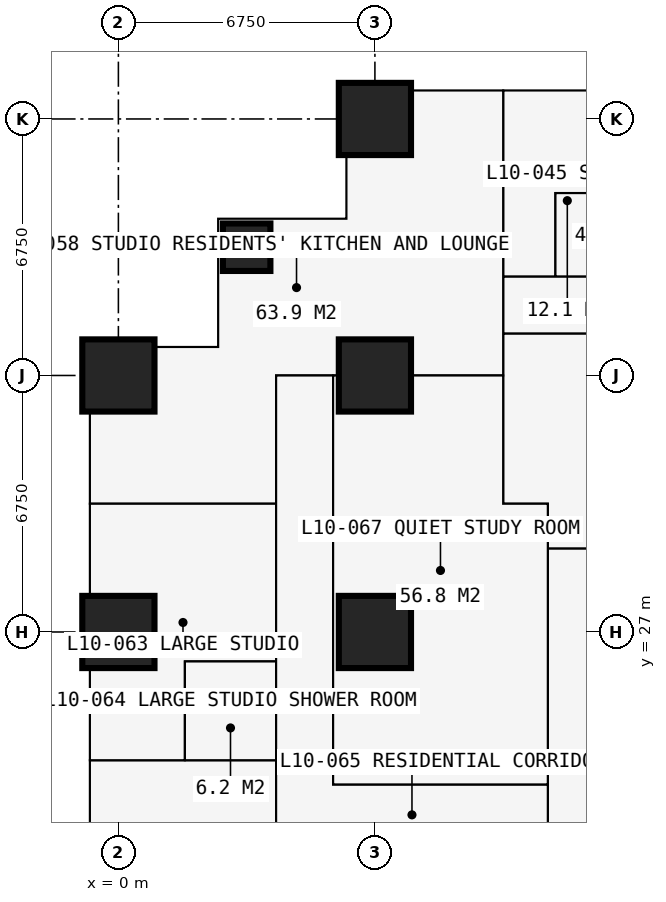
"""IFC4 building model, lengths in metres.
Left out: names, types, materials, properties, quantities, classifications, styles, units other than length and angle.
Written with IfcOpenShell. Run it as: python <this file> out.ifc"""

import sys

from ifc_helpers import new_model, si_unit, direction, frame, frame_2d, origin, origin_2d, place, context, subcontext, project, spatial, rectangle, extrude, element, fill, save


model = new_model("IFC4")
c1 = context("Model", 3, precision=1e-05, world=origin(), true_north=direction((0.0, 1.0)))
c2 = subcontext(c1, "Body", "Model", "MODEL_VIEW")
j1 = project(units=[si_unit("LENGTHUNIT", "METRE"), si_unit("PLANEANGLEUNIT", "RADIAN")], contexts=[c1])
p1 = place(None, origin())
s1 = spatial("IfcSite", under=j1, at=p1, CompositionType="ELEMENT")
p2 = place(p1, origin())
s2 = spatial("IfcBuilding", under=s1, at=p2, CompositionType="ELEMENT")
p3 = place(p2, frame((0.0, 0.0, 39.6)))
s3 = spatial("IfcBuildingStorey", under=s2, at=p3, CompositionType="ELEMENT", Elevation=39.6)
for number, where, z_axis, x_axis in (
    (1, (0.0, 27.0, 0.0), (0.0, 0.0, 1.0), (1.0, 0.0, 0.0)),
    (2, (0.0, 33.75, 0.0), (0.0, 0.0, 1.0), (1.0, 0.0, 0.0)),
):
    element("IfcColumn", number, at=place(p3, frame(where, z_axis=z_axis, x_axis=x_axis)), inside=s3, PredefinedType="COLUMN", context=c2, shape_type="SweptSolid", body=[
        extrude(rectangle(XDim=1.9, YDim=1.9, at=origin_2d()), origin(), (0.0, 0.0, 1.0), 3.6),
    ])
p4 = place(p3, frame((3.375, 37.125, 0.0), z_axis=(0.0, 0.0, 1.0), x_axis=(1.0, 0.0, 0.0)))
e3 = element("IfcColumn", 3, at=p4, inside=s3, PredefinedType="COLUMN", context=c2, shape_type="SweptSolid", body=[
    extrude(rectangle(XDim=1.25, YDim=1.25, at=origin_2d()), origin(), (0.0, 0.0, 1.0), 3.6),
])
for number, where, z_axis, x_axis in (
    (4, (6.75, 27.0, 0.0), (0.0, 0.0, 1.0), (1.0, 0.0, 0.0)),
    (5, (6.75, 33.75, 0.0), (0.0, 0.0, 1.0), (1.0, 0.0, 0.0)),
    (6, (6.75, 40.5, 0.0), (0.0, 0.0, 1.0), (1.0, 0.0, 0.0)),
):
    element("IfcColumn", number, at=place(p3, frame(where, z_axis=z_axis, x_axis=x_axis)), inside=s3, PredefinedType="COLUMN", context=c2, shape_type="SweptSolid", body=[
        extrude(rectangle(XDim=1.9, YDim=1.9, at=origin_2d()), origin(), (0.0, 0.0, 1.0), 3.6),
    ])
p5 = place(p3, frame((6.0, 41.25, 0.0), z_axis=(0.0, 0.0, 1.0), x_axis=(0.0, -1.0, 0.0)))
e7 = element("IfcWall", 7, at=p5, inside=s3, PredefinedType="SOLIDWALL", context=c2, shape_type="SweptSolid", body=[
    extrude(rectangle(XDim=3.375, YDim=0.3, at=frame_2d((1.688, 0.0))), origin(), (0.0, 0.0, 1.0), 3.375),
])
p6 = place(p5, frame((1.857, 0.0, 0.9)))
e8 = element("IfcOpeningElement", 8, at=p6, cuts=e7, PredefinedType="OPENING", context=c2, shape_type="SweptSolid", body=[
    extrude(rectangle(XDim=1.2, YDim=1.8, at=frame_2d((0.6, 0.9))), frame((0.0, 0.16, 0.0), z_axis=(0.0, -1.0, 0.0), x_axis=(1.0, 0.0, 0.0)), (0.0, 0.0, 1.0), 0.32),
])
p7 = place(p3, frame((6.0, 37.875, 0.0), z_axis=(0.0, 0.0, 1.0), x_axis=(-1.0, 0.0, 0.0)))
e9 = element("IfcWall", 9, at=p7, inside=s3, PredefinedType="SOLIDWALL", context=c2, shape_type="SweptSolid", body=[
    extrude(rectangle(XDim=3.375, YDim=0.3, at=frame_2d((1.688, 0.0))), origin(), (0.0, 0.0, 1.0), 3.375),
])
p8 = place(p7, frame((0.788, 0.0, 0.6)))
e10 = element("IfcOpeningElement", 10, at=p8, cuts=e9, PredefinedType="OPENING", context=c2, shape_type="SweptSolid", body=[
    extrude(rectangle(XDim=1.8, YDim=2.1, at=frame_2d((0.9, 1.05))), frame((0.0, 0.16, 0.0), z_axis=(0.0, -1.0, 0.0), x_axis=(1.0, 0.0, 0.0)), (0.0, 0.0, 1.0), 0.32),
])
p9 = place(p3, frame((2.625, 37.875, 0.0), z_axis=(0.0, 0.0, 1.0), x_axis=(0.0, -1.0, 0.0)))
e11 = element("IfcWall", 11, at=p9, inside=s3, PredefinedType="SOLIDWALL", context=c2, shape_type="SweptSolid", body=[
    extrude(rectangle(XDim=3.375, YDim=0.3, at=frame_2d((1.688, 0.0))), origin(), (0.0, 0.0, 1.0), 3.375),
])
p10 = place(p9, frame((0.788, 0.0, 0.6)))
e12 = element("IfcOpeningElement", 12, at=p10, cuts=e11, PredefinedType="OPENING", context=c2, shape_type="SweptSolid", body=[
    extrude(rectangle(XDim=1.8, YDim=2.1, at=frame_2d((0.9, 1.05))), frame((0.0, 0.16, 0.0), z_axis=(0.0, -1.0, 0.0), x_axis=(1.0, 0.0, 0.0)), (0.0, 0.0, 1.0), 0.32),
])
p11 = place(p3, frame((2.625, 34.5, 0.0), z_axis=(0.0, 0.0, 1.0), x_axis=(-1.0, 0.0, 0.0)))
e13 = element("IfcWall", 13, at=p11, inside=s3, PredefinedType="SOLIDWALL", context=c2, shape_type="SweptSolid", body=[
    extrude(rectangle(XDim=3.375, YDim=0.3, at=frame_2d((1.688, 0.0))), origin(), (0.0, 0.0, 1.0), 3.375),
])
p12 = place(p11, frame((0.317, 0.0, 0.9)))
e14 = element("IfcOpeningElement", 14, at=p12, cuts=e13, PredefinedType="OPENING", context=c2, shape_type="SweptSolid", body=[
    extrude(rectangle(XDim=1.2, YDim=1.8, at=frame_2d((0.6, 0.9))), frame((0.0, 0.16, 0.0), z_axis=(0.0, -1.0, 0.0), x_axis=(1.0, 0.0, 0.0)), (0.0, 0.0, 1.0), 0.32),
])
p13 = place(p3, frame((-0.734, 23.625, 0.0), z_axis=(0.0, 0.0, 1.0), x_axis=(1.0, 0.0, 0.0)))
e15 = element("IfcWall", 15, at=p13, inside=s3, PredefinedType="PARTITIONING", context=c2, shape_type="SweptSolid", body=[
    extrude(rectangle(XDim=4.884, YDim=0.175, at=frame_2d((2.442, 0.0))), origin(), (0.0, 0.0, 1.0), 3.375),
])
p14 = place(p13, frame((3.234, 0.0, 0.0)))
e16 = element("IfcOpeningElement", 16, at=p14, cuts=e15, PredefinedType="OPENING", context=c2, shape_type="SweptSolid", body=[
    extrude(rectangle(XDim=0.9, YDim=2.2, at=frame_2d((0.45, 1.1))), frame((0.0, 0.097, 0.0), z_axis=(0.0, -1.0, 0.0), x_axis=(1.0, 0.0, 0.0)), (0.0, 0.0, 1.0), 0.195),
])
p15 = place(p3, frame((-0.734, 30.375, 0.0), z_axis=(0.0, 0.0, 1.0), x_axis=(1.0, 0.0, 0.0)))
e17 = element("IfcWall", 17, at=p15, inside=s3, PredefinedType="PARTITIONING", context=c2, shape_type="SweptSolid", body=[
    extrude(rectangle(XDim=4.884, YDim=0.15, at=frame_2d((2.442, 0.0))), origin(), (0.0, 0.0, 1.0), 3.375),
])
p16 = place(p3, frame((1.75, 23.625, 0.0), z_axis=(0.0, 0.0, 1.0), x_axis=(0.0, 1.0, 0.0)))
e18 = element("IfcWall", 18, at=p16, inside=s3, PredefinedType="PARTITIONING", context=c2, shape_type="SweptSolid", body=[
    extrude(rectangle(XDim=2.6, YDim=0.1, at=frame_2d((1.3, 0.0))), origin(), (0.0, 0.0, 1.0), 3.375),
])
p17 = place(p3, frame((1.75, 26.225, 0.0), z_axis=(0.0, 0.0, 1.0), x_axis=(1.0, 0.0, 0.0)))
e19 = element("IfcWall", 19, at=p17, inside=s3, PredefinedType="PARTITIONING", context=c2, shape_type="SweptSolid", body=[
    extrude(rectangle(XDim=2.4, YDim=0.1, at=frame_2d((1.2, 0.0))), origin(), (0.0, 0.0, 1.0), 3.375),
])
p18 = place(p3, frame((4.15, 10.125, 0.0), z_axis=(0.0, 0.0, 1.0), x_axis=(0.0, 1.0, 0.0)))
e20 = element("IfcWall", 20, at=p18, inside=s3, PredefinedType="PARTITIONING", context=c2, shape_type="SweptSolid", body=[
    extrude(rectangle(XDim=23.625, YDim=0.15, at=frame_2d((11.812, 0.0))), origin(), (0.0, 0.0, 1.0), 3.375),
])
p19 = place(p18, frame((4.2, 0.0, 0.0)))
e21 = element("IfcOpeningElement", 21, at=p19, cuts=e20, PredefinedType="OPENING", context=c2, shape_type="SweptSolid", body=[
    extrude(rectangle(XDim=0.95, YDim=2.2, at=frame_2d((0.475, 1.1))), frame((0.0, 0.085, 0.0), z_axis=(0.0, -1.0, 0.0), x_axis=(1.0, 0.0, 0.0)), (0.0, 0.0, 1.0), 0.17),
])
p20 = place(p18, frame((10.95, 0.0, 0.0)))
e22 = element("IfcOpeningElement", 22, at=p20, cuts=e20, PredefinedType="OPENING", context=c2, shape_type="SweptSolid", body=[
    extrude(rectangle(XDim=0.95, YDim=2.2, at=frame_2d((0.475, 1.1))), frame((0.0, 0.085, 0.0), z_axis=(0.0, -1.0, 0.0), x_axis=(1.0, 0.0, 0.0)), (0.0, 0.0, 1.0), 0.17),
])
p21 = place(p18, frame((17.7, 0.0, 0.0)))
e23 = element("IfcOpeningElement", 23, at=p21, cuts=e20, PredefinedType="OPENING", context=c2, shape_type="SweptSolid", body=[
    extrude(rectangle(XDim=0.95, YDim=2.2, at=frame_2d((0.475, 1.1))), frame((0.0, 0.085, 0.0), z_axis=(0.0, -1.0, 0.0), x_axis=(1.0, 0.0, 0.0)), (0.0, 0.0, 1.0), 0.17),
])
p22 = place(p3, frame((4.15, 33.75, 0.0), z_axis=(0.0, 0.0, 1.0), x_axis=(1.0, 0.0, 0.0)))
e24 = element("IfcWall", 24, at=p22, inside=s3, PredefinedType="PARTITIONING", context=c2, shape_type="SweptSolid", body=[
    extrude(rectangle(XDim=5.975, YDim=0.15, at=frame_2d((2.988, 0.0))), origin(), (0.0, 0.0, 1.0), 2.877),
])
p23 = place(p3, frame((5.65, 22.988, 0.0), z_axis=(0.0, 0.0, 1.0), x_axis=(0.0, 1.0, 0.0)))
e25 = element("IfcWall", 25, at=p23, inside=s3, PredefinedType="PARTITIONING", context=c2, shape_type="SweptSolid", body=[
    extrude(rectangle(XDim=10.762, YDim=0.15, at=frame_2d((5.381, 0.0))), origin(), (0.0, 0.0, 1.0), 3.375),
])
p24 = place(p23, frame((5.0, 0.0, 0.0)))
e26 = element("IfcOpeningElement", 26, at=p24, cuts=e25, PredefinedType="OPENING", context=c2, shape_type="SweptSolid", body=[
    extrude(rectangle(XDim=0.95, YDim=2.2, at=frame_2d((0.475, 1.1))), frame((0.0, 0.085, 0.0), z_axis=(0.0, -1.0, 0.0), x_axis=(1.0, 0.0, 0.0)), (0.0, 0.0, 1.0), 0.17),
])
p25 = place(p3, frame((5.65, 22.988, 0.0), z_axis=(0.0, 0.0, 1.0), x_axis=(1.0, 0.0, 0.0)))
e27 = element("IfcWall", 27, at=p25, inside=s3, PredefinedType="PARTITIONING", context=c2, shape_type="SweptSolid", body=[
    extrude(rectangle(XDim=5.65, YDim=0.15, at=frame_2d((2.825, 0.0))), origin(), (0.0, 0.0, 1.0), 3.375),
])
p26 = place(p3, frame((10.125, 30.375, 0.0), z_axis=(0.0, 0.0, 1.0), x_axis=(0.0, 1.0, 0.0)))
e28 = element("IfcWall", 28, at=p26, inside=s3, PredefinedType="PARTITIONING", context=c2, shape_type="SweptSolid", body=[
    extrude(rectangle(XDim=10.859, YDim=0.15, at=frame_2d((5.429, 0.0))), origin(), (0.0, 0.0, 1.0), 3.375),
])
p27 = place(p26, frame((4.725, 0.0, 0.0)))
e29 = element("IfcOpeningElement", 29, at=p27, cuts=e28, PredefinedType="OPENING", context=c2, shape_type="SweptSolid", body=[
    extrude(rectangle(XDim=1.0, YDim=2.2, at=frame_2d((0.5, 1.1))), frame((0.0, 0.085, 0.0), z_axis=(0.0, -1.0, 0.0), x_axis=(1.0, 0.0, 0.0)), (0.0, 0.0, 1.0), 0.17),
])
p28 = place(p3, frame((10.125, 30.375, 0.0), z_axis=(0.0, 0.0, 1.0), x_axis=(1.0, 0.0, 0.0)))
e30 = element("IfcWall", 30, at=p28, inside=s3, PredefinedType="PARTITIONING", context=c2, shape_type="SweptSolid", body=[
    extrude(rectangle(XDim=1.175, YDim=0.15, at=frame_2d((0.587, 0.0))), origin(), (0.0, 0.0, 1.0), 3.375),
])
p29 = place(p3, frame((10.125, 34.85, 0.0), z_axis=(0.0, 0.0, 1.0), x_axis=(1.0, 0.0, 0.0)))
e31 = element("IfcWall", 31, at=p29, inside=s3, PredefinedType="PARTITIONING", context=c2, shape_type="SweptSolid", body=[
    extrude(rectangle(XDim=10.762, YDim=0.15, at=frame_2d((5.381, 0.0))), origin(), (0.0, 0.0, 1.0), 3.375),
])
p30 = place(p29, frame((4.9, 0.0, 0.0)))
e32 = element("IfcOpeningElement", 32, at=p30, cuts=e31, PredefinedType="OPENING", context=c2, shape_type="SweptSolid", body=[
    extrude(rectangle(XDim=0.95, YDim=2.2, at=frame_2d((0.475, 1.1))), frame((0.0, 0.085, 0.0), z_axis=(0.0, -1.0, 0.0), x_axis=(1.0, 0.0, 0.0)), (0.0, 0.0, 1.0), 0.17),
])
p31 = place(p3, frame((10.125, 36.35, 0.0), z_axis=(0.0, 0.0, 1.0), x_axis=(1.0, 0.0, 0.0)))
e33 = element("IfcWall", 33, at=p31, inside=s3, PredefinedType="PARTITIONING", context=c2, shape_type="SweptSolid", body=[
    extrude(rectangle(XDim=23.625, YDim=0.1, at=frame_2d((11.812, 0.0))), origin(), (0.0, 0.0, 1.0), 3.375),
])
p32 = place(p31, frame((0.2, 0.0, 0.0)))
e34 = element("IfcOpeningElement", 34, at=p32, cuts=e33, PredefinedType="OPENING", context=c2, shape_type="SweptSolid", body=[
    extrude(rectangle(XDim=0.95, YDim=2.2, at=frame_2d((0.475, 1.1))), frame((0.0, 0.06, 0.0), z_axis=(0.0, -1.0, 0.0), x_axis=(1.0, 0.0, 0.0)), (0.0, 0.0, 1.0), 0.12),
])
p33 = place(p31, frame((3.625, 0.0, 0.0)))
e35 = element("IfcOpeningElement", 35, at=p33, cuts=e33, PredefinedType="OPENING", context=c2, shape_type="SweptSolid", body=[
    extrude(rectangle(XDim=0.95, YDim=2.2, at=frame_2d((0.475, 1.1))), frame((0.0, 0.06, 0.0), z_axis=(0.0, -1.0, 0.0), x_axis=(1.0, 0.0, 0.0)), (0.0, 0.0, 1.0), 0.12),
])
p34 = place(p31, frame((7.0, 0.0, 0.0)))
e36 = element("IfcOpeningElement", 36, at=p34, cuts=e33, PredefinedType="OPENING", context=c2, shape_type="SweptSolid", body=[
    extrude(rectangle(XDim=0.95, YDim=2.2, at=frame_2d((0.475, 1.1))), frame((0.0, 0.06, 0.0), z_axis=(0.0, -1.0, 0.0), x_axis=(1.0, 0.0, 0.0)), (0.0, 0.0, 1.0), 0.12),
])
p35 = place(p31, frame((10.375, 0.0, 0.0)))
e37 = element("IfcOpeningElement", 37, at=p35, cuts=e33, PredefinedType="OPENING", context=c2, shape_type="SweptSolid", body=[
    extrude(rectangle(XDim=0.95, YDim=2.2, at=frame_2d((0.475, 1.1))), frame((0.0, 0.06, 0.0), z_axis=(0.0, -1.0, 0.0), x_axis=(1.0, 0.0, 0.0)), (0.0, 0.0, 1.0), 0.12),
])
p36 = place(p31, frame((13.75, 0.0, 0.0)))
e38 = element("IfcOpeningElement", 38, at=p36, cuts=e33, PredefinedType="OPENING", context=c2, shape_type="SweptSolid", body=[
    extrude(rectangle(XDim=0.95, YDim=2.2, at=frame_2d((0.475, 1.1))), frame((0.0, 0.06, 0.0), z_axis=(0.0, -1.0, 0.0), x_axis=(1.0, 0.0, 0.0)), (0.0, 0.0, 1.0), 0.12),
])
p37 = place(p3, frame((11.3, 11.3, 0.0), z_axis=(0.0, 0.0, 1.0), x_axis=(0.0, 1.0, 0.0)))
e39 = element("IfcWall", 39, at=p37, inside=s3, PredefinedType="PARTITIONING", context=c2, shape_type="SweptSolid", body=[
    extrude(rectangle(XDim=19.075, YDim=0.15, at=frame_2d((9.538, 0.0))), origin(), (0.0, 0.0, 1.0), 3.375),
])
p38 = place(p37, frame((10.137, 0.0, 0.0)))
e40 = element("IfcOpeningElement", 40, at=p38, cuts=e39, PredefinedType="OPENING", context=c2, shape_type="SweptSolid", body=[
    extrude(rectangle(XDim=1.0, YDim=2.2, at=frame_2d((0.5, 1.1))), frame((0.0, 0.085, 0.0), z_axis=(0.0, -1.0, 0.0), x_axis=(1.0, 0.0, 0.0)), (0.0, 0.0, 1.0), 0.17),
])
p39 = place(p3, frame((11.3, 29.2, 0.0), z_axis=(0.0, 0.0, 1.0), x_axis=(1.0, 0.0, 0.0)))
e41 = element("IfcWall", 41, at=p39, inside=s3, PredefinedType="PARTITIONING", context=c2, shape_type="SweptSolid", body=[
    extrude(rectangle(XDim=19.075, YDim=0.15, at=frame_2d((9.538, 0.0))), origin(), (0.0, 0.0, 1.0), 3.375),
])
p40 = place(p39, frame((10.137, 0.0, 0.0)))
e42 = element("IfcOpeningElement", 42, at=p40, cuts=e41, PredefinedType="OPENING", context=c2, shape_type="SweptSolid", body=[
    extrude(rectangle(XDim=1.0, YDim=2.2, at=frame_2d((0.5, 1.1))), frame((0.0, 0.085, 0.0), z_axis=(0.0, -1.0, 0.0), x_axis=(1.0, 0.0, 0.0)), (0.0, 0.0, 1.0), 0.17),
])
p41 = place(p3, frame((11.5, 36.35, 0.0), z_axis=(0.0, 0.0, 1.0), x_axis=(0.0, 1.0, 0.0)))
e43 = element("IfcWall", 43, at=p41, inside=s3, PredefinedType="PARTITIONING", context=c2, shape_type="SweptSolid", body=[
    extrude(rectangle(XDim=2.2, YDim=0.1, at=frame_2d((1.1, 0.0))), origin(), (0.0, 0.0, 1.0), 3.375),
])
p42 = place(p41, frame((0.65, 0.0, 0.0)))
e44 = element("IfcOpeningElement", 44, at=p42, cuts=e43, PredefinedType="OPENING", context=c2, shape_type="SweptSolid", body=[
    extrude(rectangle(XDim=0.9, YDim=2.2, at=frame_2d((0.45, 1.1))), frame((0.0, 0.06, 0.0), z_axis=(0.0, -1.0, 0.0), x_axis=(1.0, 0.0, 0.0)), (0.0, 0.0, 1.0), 0.12),
])
p43 = place(p3, frame((11.5, 38.55, 0.0), z_axis=(0.0, 0.0, 1.0), x_axis=(1.0, 0.0, 0.0)))
e45 = element("IfcWall", 45, at=p43, inside=s3, PredefinedType="PARTITIONING", context=c2, shape_type="SweptSolid", body=[
    extrude(rectangle(XDim=2.0, YDim=0.1, at=frame_2d((1.0, 0.0))), origin(), (0.0, 0.0, 1.0), 3.375),
])
p44 = place(p6, origin())
e46 = element("IfcWindow", 46, at=p44, inside=s3, PartitioningType="SINGLE_PANEL", PredefinedType="WINDOW", context=c2, shape_type="SweptSolid", body=[
    extrude(rectangle(XDim=1.2, YDim=1.8, at=frame_2d((0.6, 0.9))), frame((0.0, 0.03, 0.0), z_axis=(0.0, -1.0, 0.0), x_axis=(1.0, 0.0, 0.0)), (0.0, 0.0, 1.0), 0.06),
])
fill(e8, e46)
p45 = place(p8, origin())
e47 = element("IfcWindow", 47, at=p45, inside=s3, PartitioningType="SINGLE_PANEL", PredefinedType="WINDOW", context=c2, shape_type="SweptSolid", body=[
    extrude(rectangle(XDim=1.8, YDim=2.1, at=frame_2d((0.9, 1.05))), frame((0.0, 0.03, 0.0), z_axis=(0.0, -1.0, 0.0), x_axis=(1.0, 0.0, 0.0)), (0.0, 0.0, 1.0), 0.06),
])
fill(e10, e47)
p46 = place(p10, origin())
e48 = element("IfcWindow", 48, at=p46, inside=s3, PartitioningType="SINGLE_PANEL", PredefinedType="WINDOW", context=c2, shape_type="SweptSolid", body=[
    extrude(rectangle(XDim=1.8, YDim=2.1, at=frame_2d((0.9, 1.05))), frame((0.0, 0.03, 0.0), z_axis=(0.0, -1.0, 0.0), x_axis=(1.0, 0.0, 0.0)), (0.0, 0.0, 1.0), 0.06),
])
fill(e12, e48)
p47 = place(p12, origin())
e49 = element("IfcWindow", 49, at=p47, inside=s3, PartitioningType="SINGLE_PANEL", PredefinedType="WINDOW", context=c2, shape_type="SweptSolid", body=[
    extrude(rectangle(XDim=1.2, YDim=1.8, at=frame_2d((0.6, 0.9))), frame((0.0, 0.03, 0.0), z_axis=(0.0, -1.0, 0.0), x_axis=(1.0, 0.0, 0.0)), (0.0, 0.0, 1.0), 0.06),
])
fill(e14, e49)
p48 = place(p32, origin())
e50 = element("IfcDoor", 50, at=p48, inside=s3, OperationType="SINGLE_SWING_LEFT", PredefinedType="DOOR", context=c2, shape_type="SweptSolid", body=[
    extrude(rectangle(XDim=0.95, YDim=2.2, at=frame_2d((0.475, 1.1))), frame((0.0, 0.025, 0.0), z_axis=(0.0, -1.0, 0.0), x_axis=(1.0, 0.0, 0.0)), (0.0, 0.0, 1.0), 0.05),
])
fill(e34, e50)
p49 = place(p42, origin())
e51 = element("IfcDoor", 51, at=p49, inside=s3, OperationType="SINGLE_SWING_RIGHT", PredefinedType="DOOR", context=c2, shape_type="SweptSolid", body=[
    extrude(rectangle(XDim=0.9, YDim=2.2, at=frame_2d((0.45, 1.1))), frame((0.0, 0.025, 0.0), z_axis=(0.0, -1.0, 0.0), x_axis=(1.0, 0.0, 0.0)), (0.0, 0.0, 1.0), 0.05),
])
fill(e44, e51)
p50 = place(p27, origin())
e52 = element("IfcDoor", 52, at=p50, inside=s3, OperationType="SINGLE_SWING_LEFT", PredefinedType="DOOR", context=c2, shape_type="SweptSolid", body=[
    extrude(rectangle(XDim=1.0, YDim=2.2, at=frame_2d((0.5, 1.1))), frame((0.0, 0.025, 0.0), z_axis=(0.0, -1.0, 0.0), x_axis=(1.0, 0.0, 0.0)), (0.0, 0.0, 1.0), 0.05),
])
fill(e29, e52)
p51 = place(p20, origin())
e53 = element("IfcDoor", 53, at=p51, inside=s3, OperationType="SINGLE_SWING_LEFT", PredefinedType="DOOR", context=c2, shape_type="SweptSolid", body=[
    extrude(rectangle(XDim=0.95, YDim=2.2, at=frame_2d((0.475, 1.1))), frame((0.0, 0.025, 0.0), z_axis=(0.0, -1.0, 0.0), x_axis=(1.0, 0.0, 0.0)), (0.0, 0.0, 1.0), 0.05),
])
fill(e22, e53)
p52 = place(p21, origin())
e54 = element("IfcDoor", 54, at=p52, inside=s3, OperationType="SINGLE_SWING_LEFT", PredefinedType="DOOR", context=c2, shape_type="SweptSolid", body=[
    extrude(rectangle(XDim=0.95, YDim=2.2, at=frame_2d((0.475, 1.1))), frame((0.0, 0.025, 0.0), z_axis=(0.0, -1.0, 0.0), x_axis=(1.0, 0.0, 0.0)), (0.0, 0.0, 1.0), 0.05),
])
fill(e23, e54)
p53 = place(p14, origin())
e55 = element("IfcDoor", 55, at=p53, inside=s3, OperationType="SINGLE_SWING_RIGHT", PredefinedType="DOOR", context=c2, shape_type="SweptSolid", body=[
    extrude(rectangle(XDim=0.9, YDim=2.2, at=frame_2d((0.45, 1.1))), frame((0.0, 0.025, 0.0), z_axis=(0.0, -1.0, 0.0), x_axis=(1.0, 0.0, 0.0)), (0.0, 0.0, 1.0), 0.05),
])
fill(e16, e55)
p54 = place(p38, origin())
e56 = element("IfcDoor", 56, at=p54, inside=s3, OperationType="SINGLE_SWING_LEFT", PredefinedType="DOOR", context=c2, shape_type="SweptSolid", body=[
    extrude(rectangle(XDim=1.0, YDim=2.2, at=frame_2d((0.5, 1.1))), frame((0.0, 0.025, 0.0), z_axis=(0.0, -1.0, 0.0), x_axis=(1.0, 0.0, 0.0)), (0.0, 0.0, 1.0), 0.05),
])
fill(e40, e56)
p55 = place(p24, origin())
e57 = element("IfcDoor", 57, at=p55, inside=s3, OperationType="SINGLE_SWING_LEFT", PredefinedType="DOOR", context=c2, shape_type="SweptSolid", body=[
    extrude(rectangle(XDim=0.95, YDim=2.2, at=frame_2d((0.475, 1.1))), frame((0.0, 0.025, 0.0), z_axis=(0.0, -1.0, 0.0), x_axis=(1.0, 0.0, 0.0)), (0.0, 0.0, 1.0), 0.05),
])
fill(e26, e57)
save(model, sys.argv[1])
